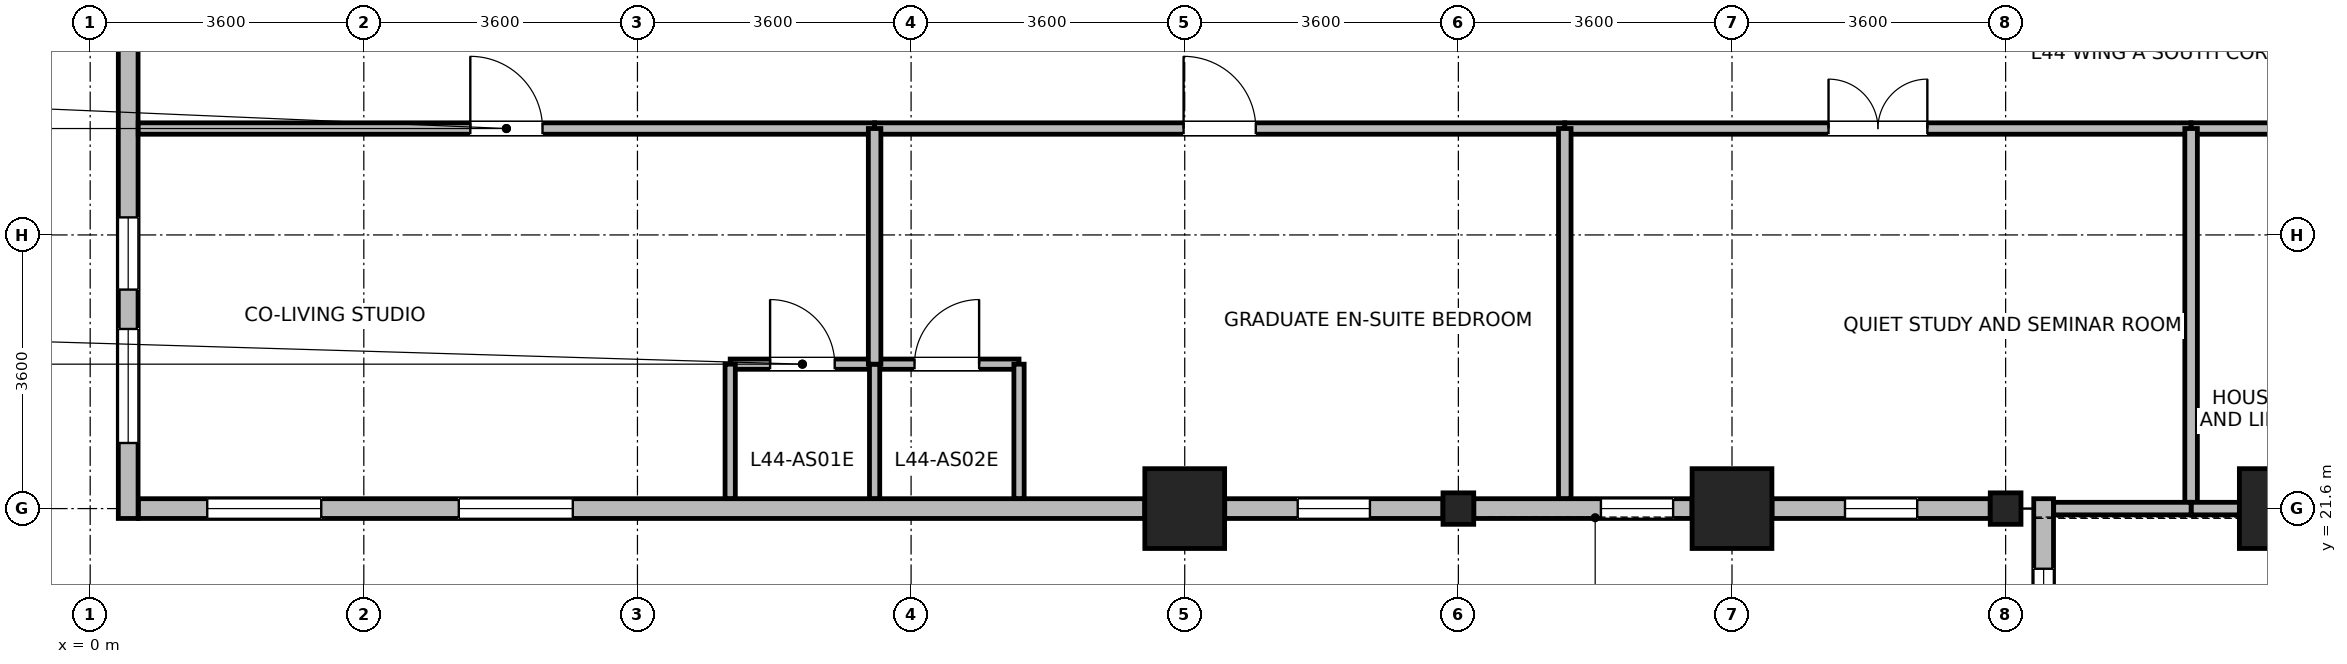
"""IFC4 building model, lengths in metres.
Left out: names, types, materials, properties, quantities, classifications, styles, units other than length and angle.
Written with IfcOpenShell. Run it as: python <this file> out.ifc"""

import sys

from ifc_helpers import new_model, si_unit, direction, frame, frame_2d, origin, origin_2d, place, context, subcontext, project, spatial, rectangle, i_section, extrude, source, transform, mapped, element, fill, save


model = new_model("IFC4")
c1 = context("Model", 3, precision=1e-05, world=origin(), true_north=direction((0.0, 1.0)))
c2 = subcontext(c1, "Body", "Model", "MODEL_VIEW")
j1 = project(units=[si_unit("LENGTHUNIT", "METRE"), si_unit("PLANEANGLEUNIT", "RADIAN")], contexts=[c1])
p1 = place(None, origin())
s1 = spatial("IfcSite", under=j1, at=p1, CompositionType="ELEMENT")
p2 = place(p1, origin())
s2 = spatial("IfcBuilding", under=s1, at=p2, CompositionType="ELEMENT")
p3 = place(p2, frame((0.0, 0.0, 173.5)))
s3 = spatial("IfcBuildingStorey", under=s2, at=p3, CompositionType="ELEMENT", Elevation=173.5)
m1 = source(origin(), c2, "Body", "SweptSolid", [
    extrude(rectangle(XDim=1.05, YDim=1.05, at=origin_2d()), origin(), (0.0, 0.0, 1.0), 3.7),
])
for number, where, z_axis, x_axis in (
    (1, (14.4, 21.6, 0.0), (0.0, 0.0, 1.0), (1.0, 0.0, 0.0)),
    (2, (21.6, 21.6, 0.0), (0.0, 0.0, 1.0), (1.0, 0.0, 0.0)),
    (3, (28.8, 21.6, 0.0), (0.0, 0.0, 1.0), (1.0, 0.0, 0.0)),
):
    element("IfcColumn", number, at=place(p3, frame(where, z_axis=z_axis, x_axis=x_axis)), inside=s3, PredefinedType="COLUMN", context=c2, shape_type="MappedRepresentation", body=[
        mapped(m1, transform((0.0, 0.0, 0.0), x_axis=(1.0, 0.0, 0.0), y_axis=(0.0, 1.0, 0.0), z_axis=(0.0, 0.0, 1.0), scale=1.0)),
    ])
m2 = source(origin(), c2, "Body", "SweptSolid", [
    extrude(i_section(OverallWidth=0.404, OverallDepth=0.414, WebThickness=0.021, FlangeThickness=0.028, FilletRadius=0.015, at=origin_2d()), origin(), (0.0, 0.0, 1.0), 3.7),
])
for number, where, z_axis, x_axis in (
    (4, (18.0, 21.6, 0.0), (0.0, 0.0, 1.0), (1.0, 0.0, 0.0)),
    (5, (25.2, 21.6, 0.0), (0.0, 0.0, 1.0), (1.0, 0.0, 0.0)),
):
    element("IfcColumn", number, at=place(p3, frame(where, z_axis=z_axis, x_axis=x_axis)), inside=s3, PredefinedType="COLUMN", context=c2, shape_type="MappedRepresentation", body=[
        mapped(m2, transform((0.0, 0.0, 0.0), x_axis=(1.0, 0.0, 0.0), y_axis=(0.0, 1.0, 0.0), z_axis=(0.0, 0.0, 1.0), scale=1.0)),
    ])
p4 = place(p3, frame((0.5, 21.47, 0.0), z_axis=(0.0, 0.0, 1.0), x_axis=(0.0, 1.0, 0.0)))
e6 = element("IfcWall", 6, at=p4, inside=s3, PredefinedType="STANDARD", context=c2, shape_type="SweptSolid", body=[
    extrude(rectangle(XDim=6.972, YDim=0.26, at=frame_2d((3.486, 0.0))), origin(), (0.0, 0.0, 1.0), 3.44),
])
p5 = place(p4, frame((0.993, 0.0, 0.85)))
e7 = element("IfcOpeningElement", 7, at=p5, cuts=e6, PredefinedType="OPENING", context=c2, shape_type="SweptSolid", body=[
    extrude(rectangle(XDim=1.5, YDim=1.85, at=frame_2d((0.75, 0.925))), frame((0.0, 0.14, 0.0), z_axis=(0.0, -1.0, 0.0), x_axis=(1.0, 0.0, 0.0)), (0.0, 0.0, 1.0), 0.28),
])
p6 = place(p4, frame((3.011, 0.0, 0.85)))
e8 = element("IfcOpeningElement", 8, at=p6, cuts=e6, PredefinedType="OPENING", context=c2, shape_type="SweptSolid", body=[
    extrude(rectangle(XDim=0.95, YDim=1.75, at=frame_2d((0.475, 0.875))), frame((0.0, 0.14, 0.0), z_axis=(0.0, -1.0, 0.0), x_axis=(1.0, 0.0, 0.0)), (0.0, 0.0, 1.0), 0.28),
])
p7 = place(p3, frame((13.874, 21.6, 0.0), z_axis=(0.0, 0.0, 1.0), x_axis=(-1.0, 0.0, 0.0)))
e9 = element("IfcWall", 9, at=p7, inside=s3, PredefinedType="STANDARD", context=c2, shape_type="SweptSolid", body=[
    extrude(rectangle(XDim=13.239, YDim=0.26, at=frame_2d((6.62, 0.0))), origin(), (0.0, 0.0, 1.0), 3.44),
])
p8 = place(p7, frame((7.524, 0.0, 0.85)))
e10 = element("IfcOpeningElement", 10, at=p8, cuts=e9, PredefinedType="OPENING", context=c2, shape_type="SweptSolid", body=[
    extrude(rectangle(XDim=1.5, YDim=1.85, at=frame_2d((0.75, 0.925))), frame((0.0, 0.14, 0.0), z_axis=(0.0, -1.0, 0.0), x_axis=(1.0, 0.0, 0.0)), (0.0, 0.0, 1.0), 0.28),
])
p9 = place(p7, frame((10.834, 0.0, 0.85)))
e11 = element("IfcOpeningElement", 11, at=p9, cuts=e9, PredefinedType="OPENING", context=c2, shape_type="SweptSolid", body=[
    extrude(rectangle(XDim=1.5, YDim=1.85, at=frame_2d((0.75, 0.925))), frame((0.0, 0.14, 0.0), z_axis=(0.0, -1.0, 0.0), x_axis=(1.0, 0.0, 0.0)), (0.0, 0.0, 1.0), 0.28),
])
p10 = place(p3, frame((17.797, 21.6, 0.0), z_axis=(0.0, 0.0, 1.0), x_axis=(-1.0, 0.0, 0.0)))
e12 = element("IfcWall", 12, at=p10, inside=s3, PredefinedType="STANDARD", context=c2, shape_type="SweptSolid", body=[
    extrude(rectangle(XDim=2.871, YDim=0.26, at=frame_2d((1.436, 0.0))), origin(), (0.0, 0.0, 1.0), 2.99),
])
p11 = place(p10, frame((0.96, 0.0, 0.85)))
e13 = element("IfcOpeningElement", 13, at=p11, cuts=e12, PredefinedType="OPENING", context=c2, shape_type="SweptSolid", body=[
    extrude(rectangle(XDim=0.95, YDim=1.75, at=frame_2d((0.475, 0.875))), frame((0.0, 0.14, 0.0), z_axis=(0.0, -1.0, 0.0), x_axis=(1.0, 0.0, 0.0)), (0.0, 0.0, 1.0), 0.28),
])
p12 = place(p3, frame((21.074, 21.6, 0.0), z_axis=(0.0, 0.0, 1.0), x_axis=(-1.0, 0.0, 0.0)))
e14 = element("IfcWall", 14, at=p12, inside=s3, PredefinedType="STANDARD", context=c2, shape_type="SweptSolid", body=[
    extrude(rectangle(XDim=2.871, YDim=0.26, at=frame_2d((1.436, 0.0))), origin(), (0.0, 0.0, 1.0), 2.99),
])
p13 = place(p12, frame((0.249, 0.0, 0.85)))
e15 = element("IfcOpeningElement", 15, at=p13, cuts=e14, PredefinedType="OPENING", context=c2, shape_type="SweptSolid", body=[
    extrude(rectangle(XDim=0.95, YDim=1.75, at=frame_2d((0.475, 0.875))), frame((0.0, 0.14, 0.0), z_axis=(0.0, -1.0, 0.0), x_axis=(1.0, 0.0, 0.0)), (0.0, 0.0, 1.0), 0.28),
])
p14 = place(p3, frame((24.997, 21.6, 0.0), z_axis=(0.0, 0.0, 1.0), x_axis=(-1.0, 0.0, 0.0)))
e16 = element("IfcWall", 16, at=p14, inside=s3, PredefinedType="STANDARD", context=c2, shape_type="SweptSolid", body=[
    extrude(rectangle(XDim=2.871, YDim=0.26, at=frame_2d((1.436, 0.0))), origin(), (0.0, 0.0, 1.0), 2.99),
])
p15 = place(p14, frame((0.96, 0.0, 0.85)))
e17 = element("IfcOpeningElement", 17, at=p15, cuts=e16, PredefinedType="OPENING", context=c2, shape_type="SweptSolid", body=[
    extrude(rectangle(XDim=0.95, YDim=1.75, at=frame_2d((0.475, 0.875))), frame((0.0, 0.14, 0.0), z_axis=(0.0, -1.0, 0.0), x_axis=(1.0, 0.0, 0.0)), (0.0, 0.0, 1.0), 0.28),
])
p16 = place(p3, frame((25.7, 1.67, 0.0), z_axis=(0.0, 0.0, 1.0), x_axis=(0.0, 1.0, 0.0)))
e18 = element("IfcWall", 18, at=p16, inside=s3, PredefinedType="STANDARD", context=c2, shape_type="SweptSolid", body=[
    extrude(rectangle(XDim=20.06, YDim=0.26, at=frame_2d((10.03, 0.0))), origin(), (0.0, 0.0, 1.0), 3.44),
])
p17 = place(p16, frame((0.922, 0.0, 0.85)))
e19 = element("IfcOpeningElement", 19, at=p17, cuts=e18, PredefinedType="OPENING", context=c2, shape_type="SweptSolid", body=[
    extrude(rectangle(XDim=1.5, YDim=1.85, at=frame_2d((0.75, 0.925))), frame((0.0, 0.14, 0.0), z_axis=(0.0, -1.0, 0.0), x_axis=(1.0, 0.0, 0.0)), (0.0, 0.0, 1.0), 0.28),
])
p18 = place(p16, frame((7.608, 0.0, 0.85)))
e20 = element("IfcOpeningElement", 20, at=p18, cuts=e18, PredefinedType="OPENING", context=c2, shape_type="SweptSolid", body=[
    extrude(rectangle(XDim=1.5, YDim=1.85, at=frame_2d((0.75, 0.925))), frame((0.0, 0.14, 0.0), z_axis=(0.0, -1.0, 0.0), x_axis=(1.0, 0.0, 0.0)), (0.0, 0.0, 1.0), 0.28),
])
p19 = place(p16, frame((10.952, 0.0, 0.85)))
e21 = element("IfcOpeningElement", 21, at=p19, cuts=e18, PredefinedType="OPENING", context=c2, shape_type="SweptSolid", body=[
    extrude(rectangle(XDim=1.5, YDim=1.85, at=frame_2d((0.75, 0.925))), frame((0.0, 0.14, 0.0), z_axis=(0.0, -1.0, 0.0), x_axis=(1.0, 0.0, 0.0)), (0.0, 0.0, 1.0), 0.28),
])
p20 = place(p16, frame((14.295, 0.0, 0.85)))
e22 = element("IfcOpeningElement", 22, at=p20, cuts=e18, PredefinedType="OPENING", context=c2, shape_type="SweptSolid", body=[
    extrude(rectangle(XDim=1.5, YDim=1.85, at=frame_2d((0.75, 0.925))), frame((0.0, 0.14, 0.0), z_axis=(0.0, -1.0, 0.0), x_axis=(1.0, 0.0, 0.0)), (0.0, 0.0, 1.0), 0.28),
])
p21 = place(p16, frame((17.638, 0.0, 0.85)))
e23 = element("IfcOpeningElement", 23, at=p21, cuts=e18, PredefinedType="OPENING", context=c2, shape_type="SweptSolid", body=[
    extrude(rectangle(XDim=1.5, YDim=1.85, at=frame_2d((0.75, 0.925))), frame((0.0, 0.14, 0.0), z_axis=(0.0, -1.0, 0.0), x_axis=(1.0, 0.0, 0.0)), (0.0, 0.0, 1.0), 0.28),
])
p22 = place(p3, frame((8.42, 23.5, 0.0), z_axis=(0.0, 0.0, 1.0), x_axis=(1.0, 0.0, 0.0)))
e24 = element("IfcWall", 24, at=p22, inside=s3, PredefinedType="PARTITIONING", context=c2, shape_type="SweptSolid", body=[
    extrude(rectangle(XDim=1.9, YDim=0.135, at=frame_2d((0.95, 0.0))), origin(), (0.0, 0.0, 1.0), 3.44),
])
p23 = place(p22, frame((0.525, 0.0, 0.0)))
e25 = element("IfcOpeningElement", 25, at=p23, cuts=e24, PredefinedType="OPENING", context=c2, shape_type="SweptSolid", body=[
    extrude(rectangle(XDim=0.85, YDim=2.04, at=frame_2d((0.425, 1.02))), frame((0.0, 0.078, 0.0), z_axis=(0.0, -1.0, 0.0), x_axis=(1.0, 0.0, 0.0)), (0.0, 0.0, 1.0), 0.155),
])
p24 = place(p3, frame((10.32, 23.5, 0.0), z_axis=(0.0, 0.0, 1.0), x_axis=(1.0, 0.0, 0.0)))
e26 = element("IfcWall", 26, at=p24, inside=s3, PredefinedType="PARTITIONING", context=c2, shape_type="SweptSolid", body=[
    extrude(rectangle(XDim=1.9, YDim=0.135, at=frame_2d((0.95, 0.0))), origin(), (0.0, 0.0, 1.0), 3.44),
])
p25 = place(p24, frame((0.525, 0.0, 0.0)))
e27 = element("IfcOpeningElement", 27, at=p25, cuts=e26, PredefinedType="OPENING", context=c2, shape_type="SweptSolid", body=[
    extrude(rectangle(XDim=0.85, YDim=2.04, at=frame_2d((0.425, 1.02))), frame((0.0, 0.078, 0.0), z_axis=(0.0, -1.0, 0.0), x_axis=(1.0, 0.0, 0.0)), (0.0, 0.0, 1.0), 0.155),
])
for number, where, z_axis, x_axis in (
    (28, (8.42, 21.732, 0.0), (0.0, 0.0, 1.0), (0.0, 1.0, 0.0)),
    (29, (10.32, 21.732, 0.0), (0.0, 0.0, 1.0), (0.0, 1.0, 0.0)),
    (30, (12.22, 21.732, 0.0), (0.0, 0.0, 1.0), (0.0, 1.0, 0.0)),
):
    element("IfcWall", number, at=place(p3, frame(where, z_axis=z_axis, x_axis=x_axis)), inside=s3, PredefinedType="PARTITIONING", context=c2, shape_type="SweptSolid", body=[
        extrude(rectangle(XDim=1.768, YDim=0.135, at=frame_2d((0.884, 0.0))), origin(), (0.0, 0.0, 1.0), 3.44),
    ])
p26 = place(p3, frame((0.632, 26.6, 0.0), z_axis=(0.0, 0.0, 1.0), x_axis=(1.0, 0.0, 0.0)))
e31 = element("IfcWall", 31, at=p26, inside=s3, PredefinedType="PARTITIONING", context=c2, shape_type="SweptSolid", body=[
    extrude(rectangle(XDim=9.688, YDim=0.15, at=frame_2d((4.844, 0.0))), origin(), (0.0, 0.0, 1.0), 3.44),
])
p27 = place(p26, frame((4.369, 0.0, 0.0)))
e32 = element("IfcOpeningElement", 32, at=p27, cuts=e31, PredefinedType="OPENING", context=c2, shape_type="SweptSolid", body=[
    extrude(rectangle(XDim=0.95, YDim=2.1, at=frame_2d((0.475, 1.05))), frame((0.0, 0.085, 0.0), z_axis=(0.0, -1.0, 0.0), x_axis=(1.0, 0.0, 0.0)), (0.0, 0.0, 1.0), 0.17),
])
p28 = place(p3, frame((10.32, 26.6, 0.0), z_axis=(0.0, 0.0, 1.0), x_axis=(1.0, 0.0, 0.0)))
e33 = element("IfcWall", 33, at=p28, inside=s3, PredefinedType="PARTITIONING", context=c2, shape_type="SweptSolid", body=[
    extrude(rectangle(XDim=9.08, YDim=0.15, at=frame_2d((4.54, 0.0))), origin(), (0.0, 0.0, 1.0), 3.44),
])
p29 = place(p28, frame((4.065, 0.0, 0.0)))
e34 = element("IfcOpeningElement", 34, at=p29, cuts=e33, PredefinedType="OPENING", context=c2, shape_type="SweptSolid", body=[
    extrude(rectangle(XDim=0.95, YDim=2.1, at=frame_2d((0.475, 1.05))), frame((0.0, 0.085, 0.0), z_axis=(0.0, -1.0, 0.0), x_axis=(1.0, 0.0, 0.0)), (0.0, 0.0, 1.0), 0.17),
])
p30 = place(p3, frame((19.4, 26.6, 0.0), z_axis=(0.0, 0.0, 1.0), x_axis=(1.0, 0.0, 0.0)))
e35 = element("IfcWall", 35, at=p30, inside=s3, PredefinedType="PARTITIONING", context=c2, shape_type="SweptSolid", body=[
    extrude(rectangle(XDim=8.24, YDim=0.15, at=frame_2d((4.12, 0.0))), origin(), (0.0, 0.0, 1.0), 3.44),
])
p31 = place(p30, frame((3.47, 0.0, 0.0)))
e36 = element("IfcOpeningElement", 36, at=p31, cuts=e35, PredefinedType="OPENING", context=c2, shape_type="SweptSolid", body=[
    extrude(rectangle(XDim=1.3, YDim=2.12, at=frame_2d((0.65, 1.06))), frame((0.0, 0.085, 0.0), z_axis=(0.0, -1.0, 0.0), x_axis=(1.0, 0.0, 0.0)), (0.0, 0.0, 1.0), 0.17),
])
p32 = place(p3, frame((27.64, 26.6, 0.0), z_axis=(0.0, 0.0, 1.0), x_axis=(1.0, 0.0, 0.0)))
e37 = element("IfcWall", 37, at=p32, inside=s3, PredefinedType="PARTITIONING", context=c2, shape_type="SweptSolid", body=[
    extrude(rectangle(XDim=2.92, YDim=0.15, at=frame_2d((1.46, 0.0))), origin(), (0.0, 0.0, 1.0), 3.44),
])
p33 = place(p3, frame((19.4, 21.732, 0.0), z_axis=(0.0, 0.0, 1.0), x_axis=(0.0, 1.0, 0.0)))
e38 = element("IfcWall", 38, at=p33, inside=s3, PredefinedType="PARTITIONING", context=c2, shape_type="SweptSolid", body=[
    extrude(rectangle(XDim=4.868, YDim=0.165, at=frame_2d((2.434, 0.0))), origin(), (0.0, 0.0, 1.0), 3.44),
])
p34 = place(p3, frame((27.64, 21.6, 0.0), z_axis=(0.0, 0.0, 1.0), x_axis=(0.0, 1.0, 0.0)))
e39 = element("IfcWall", 39, at=p34, inside=s3, PredefinedType="PARTITIONING", context=c2, shape_type="SweptSolid", body=[
    extrude(rectangle(XDim=5.0, YDim=0.165, at=frame_2d((2.5, 0.0))), origin(), (0.0, 0.0, 1.0), 3.44),
])
p35 = place(p3, frame((10.32, 23.5, 0.0), z_axis=(0.0, 0.0, 1.0), x_axis=(0.0, 1.0, 0.0)))
e40 = element("IfcWall", 40, at=p35, inside=s3, PredefinedType="PARTITIONING", context=c2, shape_type="SweptSolid", body=[
    extrude(rectangle(XDim=3.1, YDim=0.165, at=frame_2d((1.55, 0.0))), origin(), (0.0, 0.0, 1.0), 3.44),
])
p36 = place(p3, frame((27.64, 21.6, 0.0), z_axis=(0.0, 0.0, 1.0), x_axis=(1.0, 0.0, 0.0)))
e41 = element("IfcWall", 41, at=p36, inside=s3, PredefinedType="PARTITIONING", context=c2, shape_type="SweptSolid", body=[
    extrude(rectangle(XDim=2.92, YDim=0.165, at=frame_2d((1.46, 0.0))), origin(), (0.0, 0.0, 1.0), 2.99),
])
p37 = place(p3, frame((25.832, 21.6, 0.0), z_axis=(0.0, 0.0, 1.0), x_axis=(1.0, 0.0, 0.0)))
e42 = element("IfcWall", 42, at=p37, inside=s3, PredefinedType="PARTITIONING", context=c2, shape_type="SweptSolid", body=[
    extrude(rectangle(XDim=1.808, YDim=0.165, at=frame_2d((0.904, 0.0))), origin(), (0.0, 0.0, 1.0), 2.99),
])
p38 = place(p5, origin())
e43 = element("IfcWindow", 43, at=p38, inside=s3, PartitioningType="SINGLE_PANEL", PredefinedType="WINDOW", context=c2, shape_type="SweptSolid", body=[
    extrude(rectangle(XDim=1.5, YDim=1.85, at=frame_2d((0.75, 0.925))), frame((0.0, 0.03, 0.0), z_axis=(0.0, -1.0, 0.0), x_axis=(1.0, 0.0, 0.0)), (0.0, 0.0, 1.0), 0.06),
])
fill(e7, e43)
p39 = place(p6, origin())
e44 = element("IfcWindow", 44, at=p39, inside=s3, PartitioningType="SINGLE_PANEL", PredefinedType="WINDOW", context=c2, shape_type="SweptSolid", body=[
    extrude(rectangle(XDim=0.95, YDim=1.75, at=frame_2d((0.475, 0.875))), frame((0.0, 0.03, 0.0), z_axis=(0.0, -1.0, 0.0), x_axis=(1.0, 0.0, 0.0)), (0.0, 0.0, 1.0), 0.06),
])
fill(e8, e44)
p40 = place(p8, origin())
e45 = element("IfcWindow", 45, at=p40, inside=s3, PartitioningType="SINGLE_PANEL", PredefinedType="WINDOW", context=c2, shape_type="SweptSolid", body=[
    extrude(rectangle(XDim=1.5, YDim=1.85, at=frame_2d((0.75, 0.925))), frame((0.0, 0.03, 0.0), z_axis=(0.0, -1.0, 0.0), x_axis=(1.0, 0.0, 0.0)), (0.0, 0.0, 1.0), 0.06),
])
fill(e10, e45)
p41 = place(p9, origin())
e46 = element("IfcWindow", 46, at=p41, inside=s3, PartitioningType="SINGLE_PANEL", PredefinedType="WINDOW", context=c2, shape_type="SweptSolid", body=[
    extrude(rectangle(XDim=1.5, YDim=1.85, at=frame_2d((0.75, 0.925))), frame((0.0, 0.03, 0.0), z_axis=(0.0, -1.0, 0.0), x_axis=(1.0, 0.0, 0.0)), (0.0, 0.0, 1.0), 0.06),
])
fill(e11, e46)
p42 = place(p11, origin())
e47 = element("IfcWindow", 47, at=p42, inside=s3, PartitioningType="SINGLE_PANEL", PredefinedType="WINDOW", context=c2, shape_type="SweptSolid", body=[
    extrude(rectangle(XDim=0.95, YDim=1.75, at=frame_2d((0.475, 0.875))), frame((0.0, 0.03, 0.0), z_axis=(0.0, -1.0, 0.0), x_axis=(1.0, 0.0, 0.0)), (0.0, 0.0, 1.0), 0.06),
])
fill(e13, e47)
p43 = place(p13, origin())
e48 = element("IfcWindow", 48, at=p43, inside=s3, PartitioningType="SINGLE_PANEL", PredefinedType="WINDOW", context=c2, shape_type="SweptSolid", body=[
    extrude(rectangle(XDim=0.95, YDim=1.75, at=frame_2d((0.475, 0.875))), frame((0.0, 0.03, 0.0), z_axis=(0.0, -1.0, 0.0), x_axis=(1.0, 0.0, 0.0)), (0.0, 0.0, 1.0), 0.06),
])
fill(e15, e48)
p44 = place(p15, origin())
e49 = element("IfcWindow", 49, at=p44, inside=s3, PartitioningType="SINGLE_PANEL", PredefinedType="WINDOW", context=c2, shape_type="SweptSolid", body=[
    extrude(rectangle(XDim=0.95, YDim=1.75, at=frame_2d((0.475, 0.875))), frame((0.0, 0.03, 0.0), z_axis=(0.0, -1.0, 0.0), x_axis=(1.0, 0.0, 0.0)), (0.0, 0.0, 1.0), 0.06),
])
fill(e17, e49)
p45 = place(p21, origin())
e50 = element("IfcWindow", 50, at=p45, inside=s3, PartitioningType="SINGLE_PANEL", PredefinedType="WINDOW", context=c2, shape_type="SweptSolid", body=[
    extrude(rectangle(XDim=1.5, YDim=1.85, at=frame_2d((0.75, 0.925))), frame((0.0, 0.03, 0.0), z_axis=(0.0, -1.0, 0.0), x_axis=(1.0, 0.0, 0.0)), (0.0, 0.0, 1.0), 0.06),
])
fill(e23, e50)
p46 = place(p23, origin())
e51 = element("IfcDoor", 51, at=p46, inside=s3, OperationType="SINGLE_SWING_LEFT", PredefinedType="DOOR", context=c2, shape_type="SweptSolid", body=[
    extrude(rectangle(XDim=0.85, YDim=2.04, at=frame_2d((0.425, 1.02))), frame((0.0, 0.025, 0.0), z_axis=(0.0, -1.0, 0.0), x_axis=(1.0, 0.0, 0.0)), (0.0, 0.0, 1.0), 0.05),
])
fill(e25, e51)
p47 = place(p25, origin())
e52 = element("IfcDoor", 52, at=p47, inside=s3, OperationType="SINGLE_SWING_RIGHT", PredefinedType="DOOR", context=c2, shape_type="SweptSolid", body=[
    extrude(rectangle(XDim=0.85, YDim=2.04, at=frame_2d((0.425, 1.02))), frame((0.0, 0.025, 0.0), z_axis=(0.0, -1.0, 0.0), x_axis=(1.0, 0.0, 0.0)), (0.0, 0.0, 1.0), 0.05),
])
fill(e27, e52)
p48 = place(p27, origin())
e53 = element("IfcDoor", 53, at=p48, inside=s3, OperationType="SINGLE_SWING_LEFT", PredefinedType="DOOR", context=c2, shape_type="SweptSolid", body=[
    extrude(rectangle(XDim=0.95, YDim=2.1, at=frame_2d((0.475, 1.05))), frame((0.0, 0.025, 0.0), z_axis=(0.0, -1.0, 0.0), x_axis=(1.0, 0.0, 0.0)), (0.0, 0.0, 1.0), 0.05),
])
fill(e32, e53)
p49 = place(p29, origin())
e54 = element("IfcDoor", 54, at=p49, inside=s3, OperationType="SINGLE_SWING_LEFT", PredefinedType="DOOR", context=c2, shape_type="SweptSolid", body=[
    extrude(rectangle(XDim=0.95, YDim=2.1, at=frame_2d((0.475, 1.05))), frame((0.0, 0.025, 0.0), z_axis=(0.0, -1.0, 0.0), x_axis=(1.0, 0.0, 0.0)), (0.0, 0.0, 1.0), 0.05),
])
fill(e34, e54)
p50 = place(p31, origin())
e55 = element("IfcDoor", 55, at=p50, inside=s3, OperationType="DOUBLE_DOOR_SINGLE_SWING", PredefinedType="DOOR", context=c2, shape_type="SweptSolid", body=[
    extrude(rectangle(XDim=1.3, YDim=2.12, at=frame_2d((0.65, 1.06))), frame((0.0, 0.025, 0.0), z_axis=(0.0, -1.0, 0.0), x_axis=(1.0, 0.0, 0.0)), (0.0, 0.0, 1.0), 0.05),
])
fill(e36, e55)
save(model, sys.argv[1])
